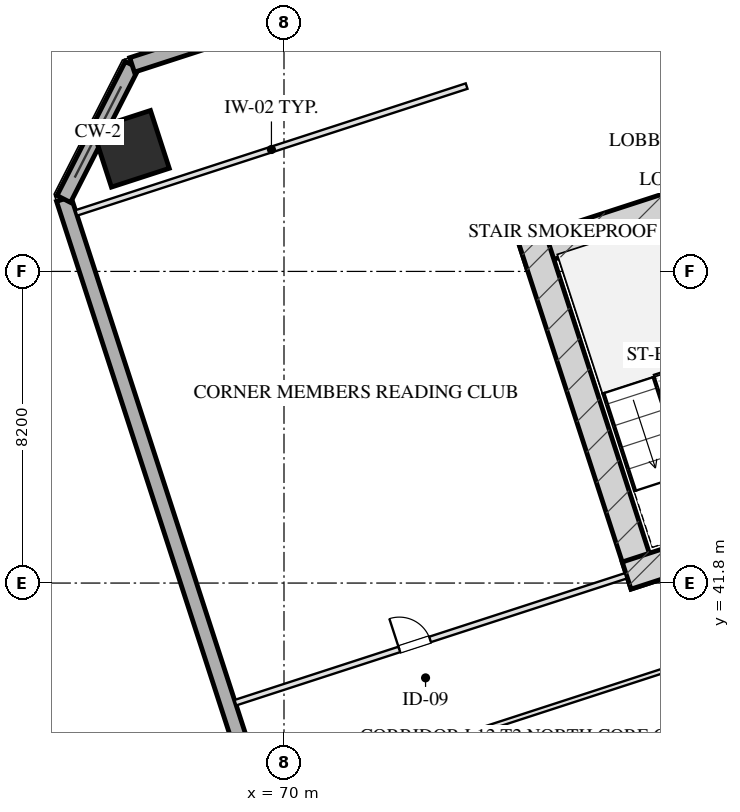
"""IFC4 building model, lengths in metres.
Left out: names, types, materials, properties, quantities, classifications, styles, units other than length and angle.
Written with IfcOpenShell. Run it as: python <this file> out.ifc"""

import sys

from ifc_helpers import new_model, si_unit, direction, frame, frame_2d, origin, origin_2d, place, context, subcontext, project, spatial, rectangle, hollow_rectangle, extrude, element, fill, save


model = new_model("IFC4")
c1 = context("Model", 3, precision=1e-05, world=origin(), true_north=direction((0.0, 1.0)))
c2 = subcontext(c1, "Body", "Model", "MODEL_VIEW")
j1 = project(units=[si_unit("LENGTHUNIT", "METRE"), si_unit("PLANEANGLEUNIT", "RADIAN")], contexts=[c1])
p1 = place(None, origin())
s1 = spatial("IfcSite", under=j1, at=p1, CompositionType="ELEMENT")
p2 = place(p1, origin())
s2 = spatial("IfcBuilding", under=s1, at=p2, CompositionType="ELEMENT")
p3 = place(p2, frame((0.0, 0.0, 54.05)))
s3 = spatial("IfcBuildingStorey", under=s2, at=p3, CompositionType="ELEMENT", Elevation=54.05)
p4 = place(p3, frame((76.272, 50.443, 0.0), z_axis=(0.0, 0.0, 1.0), x_axis=(0.951056072937, 0.309018358888, 0.0)))
e1 = element("IfcWall", 1, at=p4, inside=s3, PredefinedType="SHEAR", context=c2, shape_type="SweptSolid", body=[
    extrude(rectangle(XDim=16.55, YDim=0.75, at=frame_2d((8.275, 0.0))), origin(), (0.0, 0.0, 1.0), 3.45),
])
p5 = place(p3, frame((79.489, 41.756, 0.0), z_axis=(0.0, 0.0, 1.0), x_axis=(-0.309016134813, 0.951056795583, 0.0)))
e2 = element("IfcWall", 2, at=p5, inside=s3, PredefinedType="SHEAR", context=c2, shape_type="SweptSolid", body=[
    extrude(rectangle(XDim=9.63, YDim=0.75, at=frame_2d((4.815, 0.0))), origin(), (0.0, 0.0, 1.0), 3.45),
])
p6 = place(p3, frame((79.016, 41.997, 0.0), z_axis=(0.0, 0.0, 1.0), x_axis=(0.95106038264, 0.309005094736, 0.0)))
e3 = element("IfcWall", 3, at=p6, inside=s3, PredefinedType="SHEAR", context=c2, shape_type="SweptSolid", body=[
    extrude(rectangle(XDim=4.295, YDim=0.75, at=frame_2d((2.147, 0.0))), origin(), (0.0, 0.0, 1.0), 3.45),
])
p7 = place(p3, frame((65.973, 53.226, 0.0), z_axis=(0.0, 0.0, 1.0), x_axis=(0.951056516295, 0.309016994375, 0.0)))
e4 = element("IfcColumn", 4, at=p7, inside=s3, PredefinedType="COLUMN", context=c2, shape_type="SweptSolid", body=[
    extrude(hollow_rectangle(XDim=1.6, YDim=1.6, WallThickness=0.055, at=origin_2d()), origin(), (0.0, 0.0, 1.0), 3.451),
])
p8 = place(p3, frame((79.655, 4.352, 0.0), z_axis=(0.0, 0.0, 1.0), x_axis=(-0.309014526607, 0.951057318118, 0.0)))
e5 = element("IfcWall", 5, at=p8, inside=s3, PredefinedType="SOLIDWALL", context=c2, shape_type="SweptSolid", body=[
    extrude(rectangle(XDim=50.0, YDim=0.4, at=frame_2d((25.0, 0.0))), origin(), (0.0, 0.0, 1.0), 2.61),
])
p9 = place(p8, frame((17.35, 0.0, 0.75)))
e6 = element("IfcOpeningElement", 6, at=p9, cuts=e5, PredefinedType="OPENING", context=c2, shape_type="SweptSolid", body=[
    extrude(rectangle(XDim=2.5, YDim=1.46, at=frame_2d((1.25, 0.73))), frame((0.0, 0.21, 0.0), z_axis=(0.0, -1.0, 0.0), x_axis=(1.0, 0.0, 0.0)), (0.0, 0.0, 1.0), 0.42),
])
p10 = place(p8, frame((30.15, 0.0, 0.75)))
e7 = element("IfcOpeningElement", 7, at=p10, cuts=e5, PredefinedType="OPENING", context=c2, shape_type="SweptSolid", body=[
    extrude(rectangle(XDim=2.5, YDim=1.46, at=frame_2d((1.25, 0.73))), frame((0.0, 0.21, 0.0), z_axis=(0.0, -1.0, 0.0), x_axis=(1.0, 0.0, 0.0)), (0.0, 0.0, 1.0), 0.42),
])
p11 = place(p3, frame((64.205, 51.905, 0.0), z_axis=(0.0, 0.0, 1.0), x_axis=(0.453958106755, 0.891023028497, 0.0)))
e8 = element("IfcWall", 8, at=p11, inside=s3, PredefinedType="SOLIDWALL", context=c2, shape_type="SweptSolid", body=[
    extrude(rectangle(XDim=3.96, YDim=0.4, at=frame_2d((1.98, 0.0))), origin(), (0.0, 0.0, 1.0), 2.61),
])
p12 = place(p3, frame((66.002, 55.433, 0.0), z_axis=(0.0, 0.0, 1.0), x_axis=(0.951055939317, 0.309018770125, 0.0)))
e9 = element("IfcWall", 9, at=p12, inside=s3, PredefinedType="SOLIDWALL", context=c2, shape_type="SweptSolid", body=[
    extrude(rectangle(XDim=32.4, YDim=0.4, at=frame_2d((16.2, 0.0))), origin(), (0.0, 0.0, 1.0), 2.61),
])
p13 = place(p3, frame((64.534, 51.539, 0.0), z_axis=(0.0, 0.0, 1.0), x_axis=(0.951056658866, 0.309016555588, 0.0)))
e10 = element("IfcWall", 10, at=p13, inside=s3, PredefinedType="PARTITIONING", context=c2, shape_type="SweptSolid", body=[
    extrude(rectangle(XDim=10.8, YDim=0.15, at=frame_2d((5.4, 0.0))), origin(), (0.0, 0.0, 1.0), 3.175),
])
p14 = place(p3, frame((68.721, 38.652, 0.0), z_axis=(0.0, 0.0, 1.0), x_axis=(0.951056658866, 0.309016555588, 0.0)))
e11 = element("IfcWall", 11, at=p14, inside=s3, PredefinedType="PARTITIONING", context=c2, shape_type="SweptSolid", body=[
    extrude(rectangle(XDim=10.8, YDim=0.15, at=frame_2d((5.4, 0.0))), origin(), (0.0, 0.0, 1.0), 3.175),
])
p15 = place(p14, frame((4.536, 0.0, 0.0)))
e12 = element("IfcOpeningElement", 12, at=p15, cuts=e11, PredefinedType="OPENING", context=c2, shape_type="SweptSolid", body=[
    extrude(rectangle(XDim=0.85, YDim=2.05, at=frame_2d((0.425, 1.025))), frame((0.0, 0.085, 0.0), z_axis=(0.0, -1.0, 0.0), x_axis=(1.0, 0.0, 0.0)), (0.0, 0.0, 1.0), 0.17),
])
p16 = place(p3, frame((69.549, 36.103, 0.0), z_axis=(0.0, 0.0, 1.0), x_axis=(0.951054756643, 0.309022409974, 0.0)))
e13 = element("IfcWall", 13, at=p16, inside=s3, PredefinedType="PARTITIONING", context=c2, shape_type="SweptSolid", body=[
    extrude(rectangle(XDim=15.175, YDim=0.12, at=frame_2d((7.587, 0.0))), origin(), (0.0, 0.0, 1.0), 3.175),
])
p17 = place(p15, origin())
e14 = element("IfcDoor", 14, at=p17, inside=s3, OperationType="SINGLE_SWING_LEFT", PredefinedType="DOOR", context=c2, shape_type="SweptSolid", body=[
    extrude(rectangle(XDim=0.85, YDim=2.05, at=frame_2d((0.425, 1.025))), frame((0.0, 0.025, 0.0), z_axis=(0.0, -1.0, 0.0), x_axis=(1.0, 0.0, 0.0)), (0.0, 0.0, 1.0), 0.05),
])
fill(e12, e14)
save(model, sys.argv[1])
